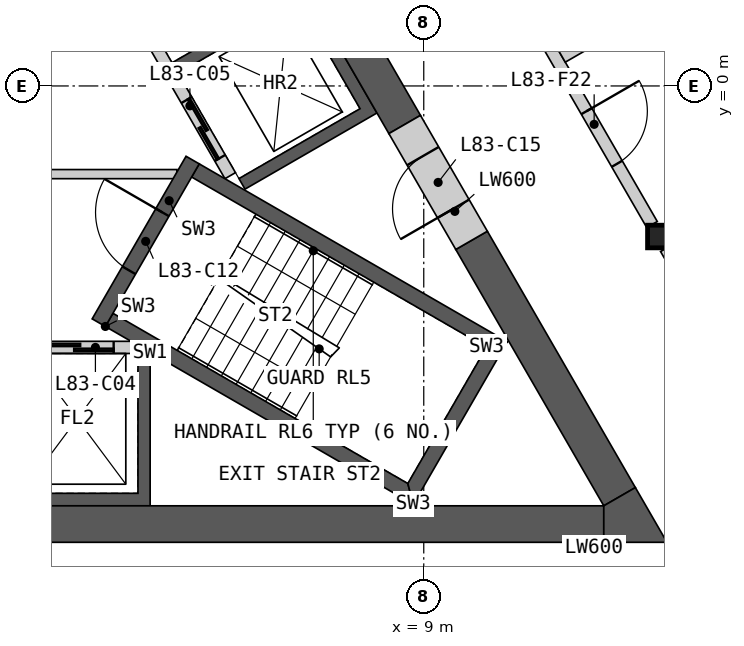
"""IFC4 building model, lengths in metres.
Left out: names, types, materials, properties, quantities, classifications, styles, units other than length and angle.
Written with IfcOpenShell. Run it as: python <this file> out.ifc"""

import sys

from ifc_helpers import new_model, si_unit, direction, frame, frame_2d, origin, origin_2d, place, context, subcontext, project, spatial, polyline, rectangle, i_section, outline, extrude, element, fill, save


model = new_model("IFC4")
c1 = context("Model", 3, precision=1e-05, world=origin(), true_north=direction((0.0, 1.0)))
c2 = subcontext(c1, "Body", "Model", "MODEL_VIEW")
j1 = project(units=[si_unit("LENGTHUNIT", "METRE"), si_unit("PLANEANGLEUNIT", "RADIAN")], contexts=[c1])
p1 = place(None, origin())
s1 = spatial("IfcSite", under=j1, at=p1, CompositionType="ELEMENT")
p2 = place(p1, origin())
s2 = spatial("IfcBuilding", under=s1, at=p2, CompositionType="ELEMENT")
p3 = place(p2, frame((0.0, 0.0, 371.2)))
s3 = spatial("IfcBuildingStorey", under=s2, at=p3, CompositionType="ELEMENT", Elevation=371.2)
p4 = place(p3, frame((12.868, -2.476, 0.0), z_axis=(0.0, 0.0, 1.0), x_axis=(1.0, 0.0, 0.0)))
e1 = element("IfcColumn", 1, at=p4, inside=s3, PredefinedType="COLUMN", context=c2, shape_type="SweptSolid", body=[
    extrude(i_section(OverallWidth=0.374, OverallDepth=0.372, WebThickness=0.016, FlangeThickness=0.026, at=origin_2d()), origin(), (0.0, 0.0, 1.0), 3.4),
])
p5 = place(p3, origin())
e2 = element("IfcWall", 2, at=p5, inside=s3, PredefinedType="SHEAR", context=c2, shape_type="SweptSolid", body=[
    extrude(outline(polyline([(4.5, -4.4), (4.5, -6.906), (-4.5, -6.906), (-4.5, -4.4), (-4.3, -4.4), (-4.3, -6.7), (-2.3, -6.7), (-2.3, -4.4), (-2.1, -4.4), (-2.1, -6.7), (-0.1, -6.7), (-0.1, -4.4), (0.1, -4.4), (0.1, -6.7), (2.1, -6.7), (2.1, -4.4), (2.3, -4.4), (2.3, -6.7), (4.3, -6.7), (4.3, -4.4), (4.5, -4.4)])), origin(), (0.0, 0.0, 1.0), 3.1),
])
p6 = place(p3, frame((-4.187, -4.3, 0.0), z_axis=(0.0, 0.0, 1.0), x_axis=(1.0, 0.0, 0.0)))
e3 = element("IfcWall", 3, at=p6, inside=s3, PredefinedType="SOLIDWALL", context=c2, shape_type="SweptSolid", body=[
    extrude(rectangle(XDim=8.373, YDim=0.2, at=frame_2d((4.187, 0.0))), origin(), (0.0, 0.0, 1.0), 3.1),
])
p7 = place(p6, frame((0.287, 0.0, 0.0)))
e4 = element("IfcOpeningElement", 4, at=p7, cuts=e3, PredefinedType="OPENING", context=c2, shape_type="SweptSolid", body=[
    extrude(rectangle(XDim=1.2, YDim=2.1, at=frame_2d((0.6, 1.05))), frame((0.0, 0.11, 0.0), z_axis=(0.0, -1.0, 0.0), x_axis=(1.0, 0.0, 0.0)), (0.0, 0.0, 1.0), 0.22),
])
p8 = place(p6, frame((2.387, 0.0, 0.0)))
e5 = element("IfcOpeningElement", 5, at=p8, cuts=e3, PredefinedType="OPENING", context=c2, shape_type="SweptSolid", body=[
    extrude(rectangle(XDim=1.4, YDim=2.1, at=frame_2d((0.7, 1.05))), frame((0.0, 0.11, 0.0), z_axis=(0.0, -1.0, 0.0), x_axis=(1.0, 0.0, 0.0)), (0.0, 0.0, 1.0), 0.22),
])
p9 = place(p6, frame((4.737, 0.0, 0.0)))
e6 = element("IfcOpeningElement", 6, at=p9, cuts=e3, PredefinedType="OPENING", context=c2, shape_type="SweptSolid", body=[
    extrude(rectangle(XDim=1.1, YDim=2.1, at=frame_2d((0.55, 1.05))), frame((0.0, 0.11, 0.0), z_axis=(0.0, -1.0, 0.0), x_axis=(1.0, 0.0, 0.0)), (0.0, 0.0, 1.0), 0.22),
])
p10 = place(p6, frame((6.887, 0.0, 0.0)))
e7 = element("IfcOpeningElement", 7, at=p10, cuts=e3, PredefinedType="OPENING", context=c2, shape_type="SweptSolid", body=[
    extrude(rectangle(XDim=1.2, YDim=2.1, at=frame_2d((0.6, 1.05))), frame((0.0, 0.11, 0.0), z_axis=(0.0, -1.0, 0.0), x_axis=(1.0, 0.0, 0.0)), (0.0, 0.0, 1.0), 0.22),
])
p11 = place(p3, origin())
e8 = element("IfcWall", 8, at=p11, inside=s3, PredefinedType="SHEAR", context=c2, shape_type="SweptSolid", body=[
    extrude(outline(polyline([(1.561, 6.097), (3.731, 7.35), (8.231, -0.444), (6.061, -1.697), (5.96, -1.524), (7.952, -0.374), (6.952, 1.358), (4.96, 0.208), (4.861, 0.381), (6.852, 1.531), (5.852, 3.263), (3.861, 2.113), (3.76, 2.287), (5.752, 3.437), (4.752, 5.169), (2.76, 4.019), (2.66, 4.192), (4.652, 5.342), (3.652, 7.074), (1.66, 5.924), (1.561, 6.097)])), origin(), (0.0, 0.0, 1.0), 3.1),
])
p12 = place(p3, frame((5.817, -1.476, 0.0), z_axis=(0.0, 0.0, 1.0), x_axis=(-0.500002616675, 0.866023893041, 0.0)))
e9 = element("IfcWall", 9, at=p12, inside=s3, PredefinedType="SOLIDWALL", context=c2, shape_type="SweptSolid", body=[
    extrude(rectangle(XDim=8.373, YDim=0.2, at=frame_2d((4.187, 0.0))), origin(), (0.0, 0.0, 1.0), 3.1),
])
p13 = place(p12, frame((0.337, 0.0, 0.0)))
e10 = element("IfcOpeningElement", 10, at=p13, cuts=e9, PredefinedType="OPENING", context=c2, shape_type="SweptSolid", body=[
    extrude(rectangle(XDim=1.1, YDim=2.1, at=frame_2d((0.55, 1.05))), frame((0.0, 0.11, 0.0), z_axis=(0.0, -1.0, 0.0), x_axis=(1.0, 0.0, 0.0)), (0.0, 0.0, 1.0), 0.22),
])
p14 = place(p12, frame((2.537, 0.0, 0.0)))
e11 = element("IfcOpeningElement", 11, at=p14, cuts=e9, PredefinedType="OPENING", context=c2, shape_type="SweptSolid", body=[
    extrude(rectangle(XDim=1.1, YDim=2.1, at=frame_2d((0.55, 1.05))), frame((0.0, 0.11, 0.0), z_axis=(0.0, -1.0, 0.0), x_axis=(1.0, 0.0, 0.0)), (0.0, 0.0, 1.0), 0.22),
])
p15 = place(p12, frame((4.737, 0.0, 0.0)))
e12 = element("IfcOpeningElement", 12, at=p15, cuts=e9, PredefinedType="OPENING", context=c2, shape_type="SweptSolid", body=[
    extrude(rectangle(XDim=1.1, YDim=2.1, at=frame_2d((0.55, 1.05))), frame((0.0, 0.11, 0.0), z_axis=(0.0, -1.0, 0.0), x_axis=(1.0, 0.0, 0.0)), (0.0, 0.0, 1.0), 0.22),
])
p16 = place(p12, frame((7.037, 0.0, 0.0)))
e13 = element("IfcOpeningElement", 13, at=p16, cuts=e9, PredefinedType="OPENING", context=c2, shape_type="SweptSolid", body=[
    extrude(rectangle(XDim=0.9, YDim=2.1, at=frame_2d((0.45, 1.05))), frame((0.0, 0.11, 0.0), z_axis=(0.0, -1.0, 0.0), x_axis=(1.0, 0.0, 0.0)), (0.0, 0.0, 1.0), 0.22),
])
p17 = place(p3, frame((-4.941, -1.45, 0.0), z_axis=(0.0, 0.0, 1.0), x_axis=(1.0, 0.0, 0.0)))
e14 = element("IfcWall", 14, at=p17, inside=s3, PredefinedType="PARTITIONING", context=c2, shape_type="SweptSolid", body=[
    extrude(rectangle(XDim=9.882, YDim=0.15, at=frame_2d((4.941, 0.0))), origin(), (0.0, 0.0, 1.0), 3.1),
])
p18 = place(p17, frame((4.391, 0.0, 0.0)))
e15 = element("IfcOpeningElement", 15, at=p18, cuts=e14, PredefinedType="OPENING", context=c2, shape_type="SweptSolid", body=[
    extrude(rectangle(XDim=1.1, YDim=2.1, at=frame_2d((0.55, 1.05))), frame((0.0, 0.085, 0.0), z_axis=(0.0, -1.0, 0.0), x_axis=(1.0, 0.0, 0.0)), (0.0, 0.0, 1.0), 0.17),
])
p19 = place(p3, origin())
e16 = element("IfcWall", 16, at=p19, inside=s3, PredefinedType="SHEAR", context=c2, shape_type="SweptSolid", body=[
    extrude(outline(polyline([(3.763, -3.956), (8.83, -6.881), (8.738, -6.539), (3.888, -3.739), (3.763, -3.956)])), origin(), (0.0, 0.0, 1.0), 3.1),
])
p20 = place(p3, origin())
e17 = element("IfcWall", 17, at=p20, inside=s3, PredefinedType="SHEAR", context=c2, shape_type="SweptSolid", body=[
    extrude(outline(polyline([(8.83, -6.881), (10.374, -4.206), (10.032, -4.298), (8.738, -6.539), (8.83, -6.881)])), origin(), (0.0, 0.0, 1.0), 3.1),
])
p21 = place(p3, origin())
e18 = element("IfcWall", 18, at=p21, inside=s3, PredefinedType="SHEAR", context=c2, shape_type="SweptSolid", body=[
    extrude(outline(polyline([(10.032, -4.298), (10.374, -4.206), (5.307, -1.281), (5.182, -1.498), (10.032, -4.298)])), origin(), (0.0, 0.0, 1.0), 3.1),
])
p22 = place(p3, frame((3.655, -3.893, 0.0), z_axis=(0.0, 0.0, 1.0), x_axis=(0.499982516597, 0.866035497597, 0.0)))
e19 = element("IfcWall", 19, at=p22, inside=s3, PredefinedType="SHEAR", context=c2, shape_type="SweptSolid", body=[
    extrude(rectangle(XDim=3.088, YDim=0.25, at=frame_2d((1.544, 0.0))), origin(), (0.0, 0.0, 1.0), 3.1),
])
p23 = place(p22, frame((0.994, 0.0, 0.0)))
e20 = element("IfcOpeningElement", 20, at=p23, cuts=e19, PredefinedType="OPENING", context=c2, shape_type="SweptSolid", body=[
    extrude(rectangle(XDim=1.1, YDim=2.1, at=frame_2d((0.55, 1.05))), frame((0.0, 0.135, 0.0), z_axis=(0.0, -1.0, 0.0), x_axis=(1.0, 0.0, 0.0)), (0.0, 0.0, 1.0), 0.27),
])
for number, where, z_axis, x_axis in (
    (21, (-4.892, -7.206, 0.0), (0.0, 0.0, 1.0), (1.0, 0.0, 0.0)),
    (22, (8.686, -0.634, 0.0), (0.0, 0.0, 1.0), (-0.5, 0.866, 0.0)),
):
    element("IfcWall", number, at=place(p3, frame(where, z_axis=z_axis, x_axis=x_axis)), inside=s3, PredefinedType="SHEAR", context=c2, shape_type="SweptSolid", body=[
        extrude(rectangle(XDim=16.853, YDim=0.6, at=frame_2d((8.426, 0.0))), origin(), (0.0, 0.0, 1.0), 3.1),
    ])
p24 = place(p3, frame((12.221, -6.756, 0.0), z_axis=(0.0, 0.0, 1.0), x_axis=(-0.50000604952, 0.866021911064, 0.0)))
e23 = element("IfcWall", 23, at=p24, inside=s3, PredefinedType="SHEAR", context=c2, shape_type="SweptSolid", body=[
    extrude(rectangle(XDim=4.869, YDim=0.6, at=frame_2d((2.434, 0.0))), origin(), (0.0, 0.0, 1.0), 3.1),
])
p25 = place(p3, origin())
e24 = element("IfcWall", 24, at=p25, inside=s3, PredefinedType="SHEAR", context=c2, shape_type="SweptSolid", body=[
    extrude(outline(polyline([(11.961, -7.506), (11.961, -6.906), (12.48, -6.606), (13.0, -7.506), (11.961, -7.506)])), origin(), (0.0, 0.0, 1.0), 3.1),
])
p26 = place(p3, frame((9.786, -2.539, 0.0), z_axis=(0.0, 0.0, 1.0), x_axis=(-0.499981787252, 0.866035918664, 0.0)))
e25 = element("IfcWall", 25, at=p26, inside=s3, PredefinedType="SHEAR", context=c2, shape_type="SweptSolid", body=[
    extrude(rectangle(XDim=2.2, YDim=0.6, at=frame_2d((1.1, 0.0))), origin(), (0.0, 0.0, 1.0), 3.1),
])
p27 = place(p26, frame((0.6, 0.0, 0.0)))
e26 = element("IfcOpeningElement", 26, at=p27, cuts=e25, PredefinedType="OPENING", context=c2, shape_type="SweptSolid", body=[
    extrude(rectangle(XDim=1.0, YDim=2.1, at=frame_2d((0.5, 1.05))), frame((0.0, 0.31, 0.0), z_axis=(0.0, -1.0, 0.0), x_axis=(1.0, 0.0, 0.0)), (0.0, 0.0, 1.0), 0.62),
])
p28 = place(p3, frame((8.692, 4.756, 0.0), z_axis=(0.0, 0.0, 1.0), x_axis=(0.500001682468, -0.866024432409, 0.0)))
e27 = element("IfcWall", 27, at=p28, inside=s3, PredefinedType="PARTITIONING", context=c2, shape_type="SweptSolid", body=[
    extrude(rectangle(XDim=8.124, YDim=0.2, at=frame_2d((4.062, 0.0))), origin(), (0.0, 0.0, 1.0), 3.1),
])
p29 = place(p28, frame((5.97, 0.0, 0.0)))
e28 = element("IfcOpeningElement", 28, at=p29, cuts=e27, PredefinedType="OPENING", context=c2, shape_type="SweptSolid", body=[
    extrude(rectangle(XDim=1.0, YDim=2.1, at=frame_2d((0.5, 1.05))), frame((0.0, 0.11, 0.0), z_axis=(0.0, -1.0, 0.0), x_axis=(1.0, 0.0, 0.0)), (0.0, 0.0, 1.0), 0.22),
])
p30 = place(p3, frame((12.981, -2.673, 0.0), z_axis=(0.0, 0.0, 1.0), x_axis=(0.499986217557, -0.866033360935, 0.0)))
e29 = element("IfcWall", 29, at=p30, inside=s3, PredefinedType="PARTITIONING", context=c2, shape_type="SweptSolid", body=[
    extrude(rectangle(XDim=4.3, YDim=0.2, at=frame_2d((2.15, 0.0))), origin(), (0.0, 0.0, 1.0), 3.1),
])
p31 = place(p3, frame((11.265, 0.5, 0.0), z_axis=(0.0, 0.0, 1.0), x_axis=(0.866051307416, 0.49995513091, 0.0)))
e30 = element("IfcWall", 30, at=p31, inside=s3, PredefinedType="PARTITIONING", context=c2, shape_type="SweptSolid", body=[
    extrude(rectangle(XDim=2.725, YDim=0.25, at=frame_2d((1.362, 0.0))), origin(), (0.0, 0.0, 1.0), 2.33),
])
p32 = place(p10, origin())
e31 = element("IfcDoor", 31, at=p32, inside=s3, OperationType="SLIDING_TO_LEFT", PredefinedType="DOOR", context=c2, shape_type="SweptSolid", body=[
    extrude(rectangle(XDim=1.2, YDim=2.1, at=frame_2d((0.6, 1.05))), frame((0.0, 0.025, 0.0), z_axis=(0.0, -1.0, 0.0), x_axis=(1.0, 0.0, 0.0)), (0.0, 0.0, 1.0), 0.05),
])
fill(e7, e31)
p33 = place(p13, origin())
e32 = element("IfcDoor", 32, at=p33, inside=s3, OperationType="SLIDING_TO_LEFT", PredefinedType="DOOR", context=c2, shape_type="SweptSolid", body=[
    extrude(rectangle(XDim=1.1, YDim=2.1, at=frame_2d((0.55, 1.05))), frame((0.0, 0.025, 0.0), z_axis=(0.0, -1.0, 0.0), x_axis=(1.0, 0.0, 0.0)), (0.0, 0.0, 1.0), 0.05),
])
fill(e10, e32)
p34 = place(p23, origin())
e33 = element("IfcDoor", 33, at=p34, inside=s3, OperationType="SINGLE_SWING_RIGHT", PredefinedType="DOOR", context=c2, shape_type="SweptSolid", body=[
    extrude(rectangle(XDim=1.1, YDim=2.1, at=frame_2d((0.55, 1.05))), frame((0.0, 0.025, 0.0), z_axis=(0.0, -1.0, 0.0), x_axis=(1.0, 0.0, 0.0)), (0.0, 0.0, 1.0), 0.05),
])
fill(e20, e33)
p35 = place(p27, origin())
e34 = element("IfcDoor", 34, at=p35, inside=s3, OperationType="SINGLE_SWING_LEFT", PredefinedType="DOOR", context=c2, shape_type="SweptSolid", body=[
    extrude(rectangle(XDim=1.0, YDim=2.1, at=frame_2d((0.5, 1.05))), frame((0.0, 0.055, 0.0), z_axis=(0.0, -1.0, 0.0), x_axis=(1.0, 0.0, 0.0)), (0.0, 0.0, 1.0), 0.05),
])
fill(e26, e34)
p36 = place(p29, origin())
e35 = element("IfcDoor", 35, at=p36, inside=s3, OperationType="SINGLE_SWING_LEFT", PredefinedType="DOOR", context=c2, shape_type="SweptSolid", body=[
    extrude(rectangle(XDim=1.0, YDim=2.1, at=frame_2d((0.5, 1.05))), frame((0.0, 0.025, 0.0), z_axis=(0.0, -1.0, 0.0), x_axis=(1.0, 0.0, 0.0)), (0.0, 0.0, 1.0), 0.05),
])
fill(e28, e35)
save(model, sys.argv[1])
